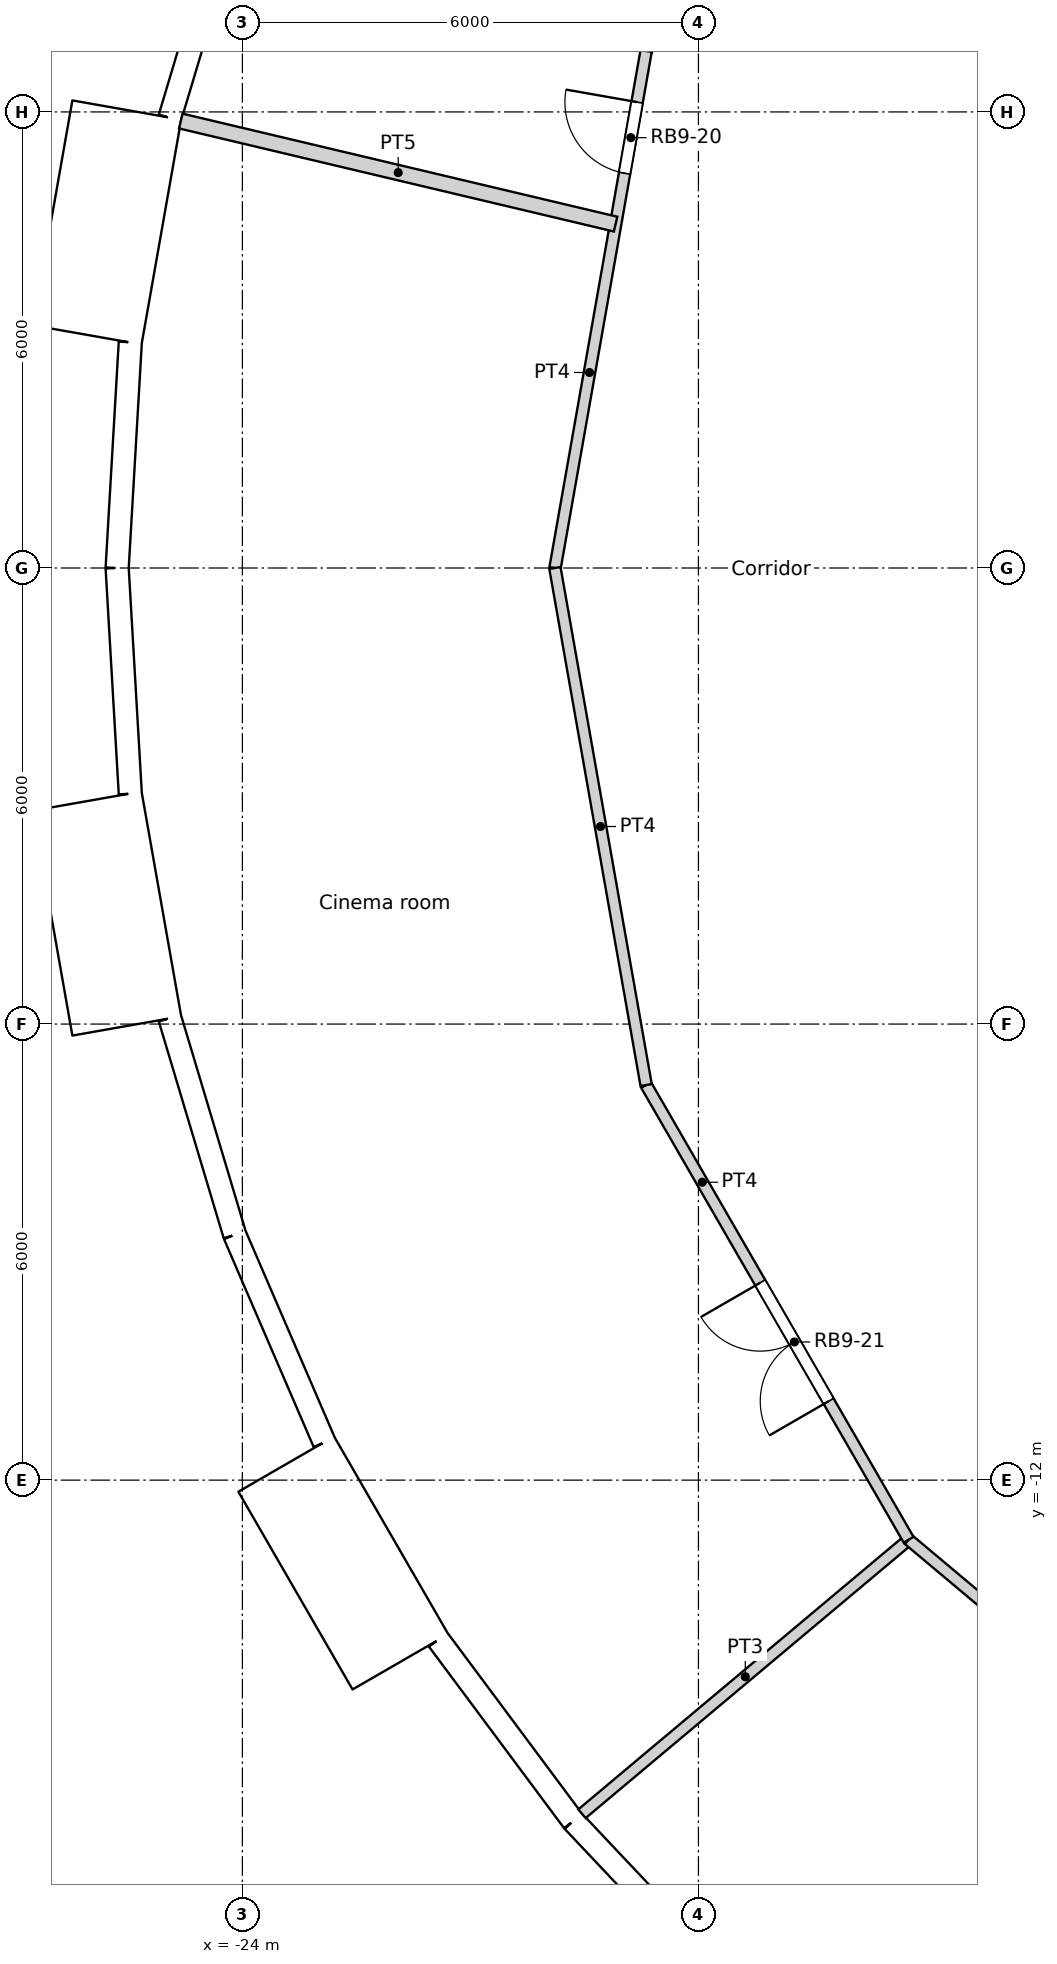
"""IFC4 building model, lengths in metres.
Left out: names, types, materials, properties, quantities, classifications, styles, units other than length and angle.
Written with IfcOpenShell. Run it as: python <this file> out.ifc"""

import sys

from ifc_helpers import new_model, si_unit, direction, frame, frame_2d, origin, origin_2d, place, context, subcontext, project, spatial, rectangle, circle, extrude, element, fill, save


model = new_model("IFC4")
c1 = context("Model", 3, precision=1e-05, world=origin(), true_north=direction((0.0, 1.0)))
c2 = subcontext(c1, "Body", "Model", "MODEL_VIEW")
j1 = project(units=[si_unit("LENGTHUNIT", "METRE"), si_unit("PLANEANGLEUNIT", "RADIAN")], contexts=[c1])
p1 = place(None, origin())
s1 = spatial("IfcSite", under=j1, at=p1, CompositionType="ELEMENT")
p2 = place(p1, origin())
s2 = spatial("IfcBuilding", under=s1, at=p2, CompositionType="ELEMENT")
p3 = place(p2, frame((0.0, 0.0, 212.4)))
s3 = spatial("IfcBuildingStorey", under=s2, at=p3, CompositionType="ELEMENT", Elevation=212.4)
for number, where, z_axis, x_axis in (
    (1, (-24.382, 2.85, 0.0), (0.0, 0.0, 1.0), (1.0, 0.0, 0.0)),
    (2, (-24.382, -2.85, 0.0), (0.0, 0.0, 1.0), (1.0, 0.0, 0.0)),
    (3, (-23.067, -8.396, 0.0), (0.0, 0.0, 1.0), (1.0, 0.0, 0.0)),
    (4, (-20.509, -13.489, 0.0), (0.0, 0.0, 1.0), (1.0, 0.0, 0.0)),
    (5, (-16.846, -17.855, 0.0), (0.0, 0.0, 1.0), (1.0, 0.0, 0.0)),
):
    element("IfcColumn", number, at=place(p3, frame(where, z_axis=z_axis, x_axis=x_axis)), inside=s3, PredefinedType="COLUMN", context=c2, shape_type="SweptSolid", body=[
        extrude(circle(Radius=0.6, at=origin_2d()), origin(), (0.0, 0.0, 1.0), 3.6),
    ])
for number, where, z_axis, x_axis in (
    (6, (-18.612, 2.805, 0.0), (0.0, 0.0, 1.0), (1.0, 0.0, 0.0)),
    (7, (-18.612, -2.805, 0.0), (0.0, 0.0, 1.0), (1.0, 0.0, 0.0)),
    (8, (-16.958, -8.167, 0.0), (0.0, 0.0, 1.0), (1.0, 0.0, 0.0)),
    (9, (-13.798, -12.802, 0.0), (0.0, 0.0, 1.0), (1.0, 0.0, 0.0)),
):
    element("IfcColumn", number, at=place(p3, frame(where, z_axis=z_axis, x_axis=x_axis)), inside=s3, PredefinedType="COLUMN", context=c2, shape_type="SweptSolid", body=[
        extrude(circle(Radius=0.65, at=origin_2d()), origin(), (0.0, 0.0, 1.0), 3.6),
    ])
p4 = place(p3, frame((-24.101, 8.772, 0.0), z_axis=(0.0, 0.0, 1.0), x_axis=(-0.286782750849, -0.957995643944, 0.0)))
e10 = element("IfcWall", 10, at=p4, inside=s3, PredefinedType="SOLIDWALL", context=c2, shape_type="SweptSolid", body=[
    extrude(rectangle(XDim=2.973, YDim=0.3, at=frame_2d((1.486, 0.0))), origin(), (0.0, 0.0, 1.0), 3.3),
])
p5 = place(p4, frame((1.486, 0.0, 1.55)))
e11 = element("IfcOpeningElement", 11, at=p5, cuts=e10, PredefinedType="OPENING", context=c2, shape_type="SweptSolid", body=[
    extrude(circle(Radius=0.9, at=origin_2d()), frame((0.0, 0.16, 0.0), z_axis=(0.0, -1.0, 0.0), x_axis=(1.0, 0.0, 0.0)), (0.0, 0.0, 1.0), 0.32),
])
p6 = place(p3, frame((-25.521, 6.023, -0.3), z_axis=(0.0, 0.0, 1.0), x_axis=(-0.173669267716, -0.984804034035, 0.0)))
e12 = element("IfcWall", 12, at=p6, inside=s3, PredefinedType="ELEMENTEDWALL", context=c2, shape_type="SweptSolid", body=[
    extrude(rectangle(XDim=3.0, YDim=1.45, at=frame_2d((1.5, 0.0))), origin(), (0.0, 0.0, 1.0), 3.6),
])
p7 = place(p6, frame((1.5, 0.0, 1.85)))
e13 = element("IfcOpeningElement", 13, at=p7, cuts=e12, PredefinedType="OPENING", context=c2, shape_type="SweptSolid", body=[
    extrude(circle(Radius=0.9, at=origin_2d()), frame((0.0, 0.735, 0.0), z_axis=(0.0, -1.0, 0.0), x_axis=(1.0, 0.0, 0.0)), (0.0, 0.0, 1.0), 1.47),
])
p8 = place(p3, frame((-25.475, 2.968, 0.0), z_axis=(0.0, 0.0, 1.0), x_axis=(-0.058144307138, -0.998308188661, 0.0)))
e14 = element("IfcWall", 14, at=p8, inside=s3, PredefinedType="SOLIDWALL", context=c2, shape_type="SweptSolid", body=[
    extrude(rectangle(XDim=2.973, YDim=0.3, at=frame_2d((1.486, 0.0))), origin(), (0.0, 0.0, 1.0), 3.3),
])
p9 = place(p8, frame((1.486, 0.0, 1.55)))
e15 = element("IfcOpeningElement", 15, at=p9, cuts=e14, PredefinedType="OPENING", context=c2, shape_type="SweptSolid", body=[
    extrude(circle(Radius=0.9, at=origin_2d()), frame((0.0, 0.16, 0.0), z_axis=(0.0, -1.0, 0.0), x_axis=(1.0, 0.0, 0.0)), (0.0, 0.0, 1.0), 0.32),
])
p10 = place(p3, frame((-25.647, 0.0, 0.0), z_axis=(0.0, 0.0, 1.0), x_axis=(0.058144307138, -0.998308188661, 0.0)))
e16 = element("IfcWall", 16, at=p10, inside=s3, PredefinedType="SOLIDWALL", context=c2, shape_type="SweptSolid", body=[
    extrude(rectangle(XDim=2.973, YDim=0.3, at=frame_2d((1.486, 0.0))), origin(), (0.0, 0.0, 1.0), 3.3),
])
p11 = place(p10, frame((1.486, 0.0, 1.55)))
e17 = element("IfcOpeningElement", 17, at=p11, cuts=e16, PredefinedType="OPENING", context=c2, shape_type="SweptSolid", body=[
    extrude(circle(Radius=0.9, at=origin_2d()), frame((0.0, 0.16, 0.0), z_axis=(0.0, -1.0, 0.0), x_axis=(1.0, 0.0, 0.0)), (0.0, 0.0, 1.0), 0.32),
])
p12 = place(p3, frame((-26.042, -3.069, -0.3), z_axis=(0.0, 0.0, 1.0), x_axis=(0.173669267716, -0.984804034035, 0.0)))
e18 = element("IfcWall", 18, at=p12, inside=s3, PredefinedType="ELEMENTEDWALL", context=c2, shape_type="SweptSolid", body=[
    extrude(rectangle(XDim=3.0, YDim=1.45, at=frame_2d((1.5, 0.0))), origin(), (0.0, 0.0, 1.0), 3.6),
])
p13 = place(p12, frame((1.5, 0.0, 1.85)))
e19 = element("IfcOpeningElement", 19, at=p13, cuts=e18, PredefinedType="OPENING", context=c2, shape_type="SweptSolid", body=[
    extrude(circle(Radius=0.9, at=origin_2d()), frame((0.0, 0.735, 0.0), z_axis=(0.0, -1.0, 0.0), x_axis=(1.0, 0.0, 0.0)), (0.0, 0.0, 1.0), 1.47),
])
p14 = place(p3, frame((-24.953, -5.924, 0.0), z_axis=(0.0, 0.0, 1.0), x_axis=(0.286782750849, -0.957995643944, 0.0)))
e20 = element("IfcWall", 20, at=p14, inside=s3, PredefinedType="SOLIDWALL", context=c2, shape_type="SweptSolid", body=[
    extrude(rectangle(XDim=2.973, YDim=0.3, at=frame_2d((1.486, 0.0))), origin(), (0.0, 0.0, 1.0), 3.3),
])
p15 = place(p14, frame((1.486, 0.0, 1.55)))
e21 = element("IfcOpeningElement", 21, at=p15, cuts=e20, PredefinedType="OPENING", context=c2, shape_type="SweptSolid", body=[
    extrude(circle(Radius=0.9, at=origin_2d()), frame((0.0, 0.16, 0.0), z_axis=(0.0, -1.0, 0.0), x_axis=(1.0, 0.0, 0.0)), (0.0, 0.0, 1.0), 0.32),
])
p16 = place(p3, frame((-24.101, -8.772, 0.0), z_axis=(0.0, 0.0, 1.0), x_axis=(0.396148129016, -0.918186614952, 0.0)))
e22 = element("IfcWall", 22, at=p16, inside=s3, PredefinedType="SOLIDWALL", context=c2, shape_type="SweptSolid", body=[
    extrude(rectangle(XDim=2.973, YDim=0.3, at=frame_2d((1.486, 0.0))), origin(), (0.0, 0.0, 1.0), 3.3),
])
p17 = place(p16, frame((1.486, 0.0, 1.55)))
e23 = element("IfcOpeningElement", 23, at=p17, cuts=e22, PredefinedType="OPENING", context=c2, shape_type="SweptSolid", body=[
    extrude(circle(Radius=0.9, at=origin_2d()), frame((0.0, 0.16, 0.0), z_axis=(0.0, -1.0, 0.0), x_axis=(1.0, 0.0, 0.0)), (0.0, 0.0, 1.0), 0.32),
])
p18 = place(p3, frame((-23.422, -11.791, -0.3), z_axis=(0.0, 0.0, 1.0), x_axis=(0.499990139034, -0.866031096941, 0.0)))
e24 = element("IfcWall", 24, at=p18, inside=s3, PredefinedType="ELEMENTEDWALL", context=c2, shape_type="SweptSolid", body=[
    extrude(rectangle(XDim=3.0, YDim=1.45, at=frame_2d((1.5, 0.0))), origin(), (0.0, 0.0, 1.0), 3.6),
])
p19 = place(p18, frame((1.5, 0.0, 1.85)))
e25 = element("IfcOpeningElement", 25, at=p19, cuts=e24, PredefinedType="OPENING", context=c2, shape_type="SweptSolid", body=[
    extrude(circle(Radius=0.9, at=origin_2d()), frame((0.0, 0.735, 0.0), z_axis=(0.0, -1.0, 0.0), x_axis=(1.0, 0.0, 0.0)), (0.0, 0.0, 1.0), 1.47),
])
p20 = place(p3, frame((-21.422, -14.101, 0.0), z_axis=(0.0, 0.0, 1.0), x_axis=(0.597197580538, -0.80209416517, 0.0)))
e26 = element("IfcWall", 26, at=p20, inside=s3, PredefinedType="SOLIDWALL", context=c2, shape_type="SweptSolid", body=[
    extrude(rectangle(XDim=2.973, YDim=0.3, at=frame_2d((1.486, 0.0))), origin(), (0.0, 0.0, 1.0), 3.3),
])
p21 = place(p20, frame((1.486, 0.0, 1.55)))
e27 = element("IfcOpeningElement", 27, at=p21, cuts=e26, PredefinedType="OPENING", context=c2, shape_type="SweptSolid", body=[
    extrude(circle(Radius=0.9, at=origin_2d()), frame((0.0, 0.16, 0.0), z_axis=(0.0, -1.0, 0.0), x_axis=(1.0, 0.0, 0.0)), (0.0, 0.0, 1.0), 0.32),
])
p22 = place(p3, frame((-19.647, -16.486, 0.0), z_axis=(0.0, 0.0, 1.0), x_axis=(0.686235184166, -0.727379730273, 0.0)))
e28 = element("IfcWall", 28, at=p22, inside=s3, PredefinedType="SOLIDWALL", context=c2, shape_type="SweptSolid", body=[
    extrude(rectangle(XDim=2.973, YDim=0.3, at=frame_2d((1.486, 0.0))), origin(), (0.0, 0.0, 1.0), 3.3),
])
p23 = place(p22, frame((1.486, 0.0, 1.55)))
e29 = element("IfcOpeningElement", 29, at=p23, cuts=e28, PredefinedType="OPENING", context=c2, shape_type="SweptSolid", body=[
    extrude(circle(Radius=0.9, at=origin_2d()), frame((0.0, 0.16, 0.0), z_axis=(0.0, -1.0, 0.0), x_axis=(1.0, 0.0, 0.0)), (0.0, 0.0, 1.0), 0.32),
])
p24 = place(p3, frame((-18.688, 6.802, 0.0), z_axis=(0.0, 0.0, 1.0), x_axis=(0.499914202267, 0.866074933462, 0.0)))
e30 = element("IfcWall", 30, at=p24, inside=s3, PredefinedType="PARTITIONING", context=c2, shape_type="SweptSolid", body=[
    extrude(rectangle(XDim=6.907, YDim=0.15, at=frame_2d((3.454, 0.0))), origin(), (0.0, 0.0, 1.0), 3.15),
])
p25 = place(p24, frame((3.857, 0.0, 0.0)))
e31 = element("IfcOpeningElement", 31, at=p25, cuts=e30, PredefinedType="OPENING", context=c2, shape_type="SweptSolid", body=[
    extrude(rectangle(XDim=1.5, YDim=2.1, at=frame_2d((0.75, 1.05))), frame((0.0, 0.075, 0.0), z_axis=(0.0, -1.0, 0.0), x_axis=(1.0, 0.0, 0.0)), (0.0, 0.0, 1.0), 0.15),
])
p26 = place(p3, frame((-19.886, -0.0, 0.0), z_axis=(0.0, 0.0, 1.0), x_axis=(0.173482860149, 0.984836888644, 0.0)))
e32 = element("IfcWall", 32, at=p26, inside=s3, PredefinedType="PARTITIONING", context=c2, shape_type="SweptSolid", body=[
    extrude(rectangle(XDim=6.907, YDim=0.15, at=frame_2d((3.454, 0.0))), origin(), (0.0, 0.0, 1.0), 3.15),
])
p27 = place(p26, frame((5.274, 0.0, 0.0)))
e33 = element("IfcOpeningElement", 33, at=p27, cuts=e32, PredefinedType="OPENING", context=c2, shape_type="SweptSolid", body=[
    extrude(rectangle(XDim=0.95, YDim=2.1, at=frame_2d((0.475, 1.05))), frame((0.0, 0.075, 0.0), z_axis=(0.0, -1.0, 0.0), x_axis=(1.0, 0.0, 0.0)), (0.0, 0.0, 1.0), 0.15),
])
p28 = place(p3, frame((-18.688, -6.802, 0.0), z_axis=(0.0, 0.0, 1.0), x_axis=(0.499914202267, -0.866074933462, 0.0)))
e34 = element("IfcWall", 34, at=p28, inside=s3, PredefinedType="PARTITIONING", context=c2, shape_type="SweptSolid", body=[
    extrude(rectangle(XDim=6.907, YDim=0.15, at=frame_2d((3.454, 0.0))), origin(), (0.0, 0.0, 1.0), 3.15),
])
p29 = place(p28, frame((3.003, 0.0, 0.0)))
e35 = element("IfcOpeningElement", 35, at=p29, cuts=e34, PredefinedType="OPENING", context=c2, shape_type="SweptSolid", body=[
    extrude(rectangle(XDim=1.8, YDim=2.1, at=frame_2d((0.9, 1.05))), frame((0.0, 0.075, 0.0), z_axis=(0.0, -1.0, 0.0), x_axis=(1.0, 0.0, 0.0)), (0.0, 0.0, 1.0), 0.15),
])
p30 = place(p3, frame((-19.888, 0.0, 0.0), z_axis=(0.0, 0.0, 1.0), x_axis=(0.173728873845, -0.98479352069, 0.0)))
e36 = element("IfcWall", 36, at=p30, inside=s3, PredefinedType="PARTITIONING", context=c2, shape_type="SweptSolid", body=[
    extrude(rectangle(XDim=6.907, YDim=0.15, at=frame_2d((3.454, 0.0))), origin(), (0.0, 0.0, 1.0), 3.15),
])
p31 = place(p3, frame((-15.235, -12.784, 0.0), z_axis=(0.0, 0.0, 1.0), x_axis=(0.766192104565, -0.642611592567, 0.0)))
e37 = element("IfcWall", 37, at=p31, inside=s3, PredefinedType="PARTITIONING", context=c2, shape_type="SweptSolid", body=[
    extrude(rectangle(XDim=6.906, YDim=0.15, at=frame_2d((3.453, 0.0))), origin(), (0.0, 0.0, 1.0), 3.15),
])
p32 = place(p31, frame((3.823, 0.0, 0.0)))
e38 = element("IfcOpeningElement", 38, at=p32, cuts=e37, PredefinedType="OPENING", context=c2, shape_type="SweptSolid", body=[
    extrude(rectangle(XDim=1.0, YDim=2.04, at=frame_2d((0.5, 1.02))), frame((0.0, 0.075, 0.0), z_axis=(0.0, -1.0, 0.0), x_axis=(1.0, 0.0, 0.0)), (0.0, 0.0, 1.0), 0.15),
])
p33 = place(p3, frame((-24.81, 5.88, 0.0), z_axis=(0.0, 0.0, 1.0), x_axis=(0.973033452951, -0.230664040193, 0.0)))
e39 = element("IfcWall", 39, at=p33, inside=s3, PredefinedType="PARTITIONING", context=c2, shape_type="SweptSolid", body=[
    extrude(rectangle(XDim=5.878, YDim=0.2, at=frame_2d((2.939, 0.0))), origin(), (0.0, 0.0, 1.0), 3.15),
])
p34 = place(p3, frame((-19.532, -16.389, 0.0), z_axis=(0.0, 0.0, 1.0), x_axis=(0.76609059793, 0.642732600514, 0.0)))
e40 = element("IfcWall", 40, at=p34, inside=s3, PredefinedType="PARTITIONING", context=c2, shape_type="SweptSolid", body=[
    extrude(rectangle(XDim=5.609, YDim=0.15, at=frame_2d((2.804, 0.0))), origin(), (0.0, 0.0, 1.0), 3.15),
])
p35 = place(p5, origin())
e41 = element("IfcWindow", 41, at=p35, inside=s3, PartitioningType="SINGLE_PANEL", PredefinedType="WINDOW", context=c2, shape_type="SweptSolid", body=[
    extrude(circle(Radius=0.9, at=origin_2d()), frame((0.0, 0.12, 0.0), z_axis=(0.0, -1.0, 0.0), x_axis=(1.0, 0.0, 0.0)), (0.0, 0.0, 1.0), 0.1),
])
fill(e11, e41)
p36 = place(p7, origin())
e42 = element("IfcWindow", 42, at=p36, inside=s3, PartitioningType="SINGLE_PANEL", PredefinedType="WINDOW", context=c2, shape_type="SweptSolid", body=[
    extrude(circle(Radius=0.9, at=origin_2d()), frame((0.0, 0.695, 0.0), z_axis=(0.0, -1.0, 0.0), x_axis=(1.0, 0.0, 0.0)), (0.0, 0.0, 1.0), 0.1),
])
fill(e13, e42)
p37 = place(p9, origin())
e43 = element("IfcWindow", 43, at=p37, inside=s3, PartitioningType="SINGLE_PANEL", PredefinedType="WINDOW", context=c2, shape_type="SweptSolid", body=[
    extrude(circle(Radius=0.9, at=origin_2d()), frame((0.0, 0.12, 0.0), z_axis=(0.0, -1.0, 0.0), x_axis=(1.0, 0.0, 0.0)), (0.0, 0.0, 1.0), 0.1),
])
fill(e15, e43)
p38 = place(p11, origin())
e44 = element("IfcWindow", 44, at=p38, inside=s3, PartitioningType="SINGLE_PANEL", PredefinedType="WINDOW", context=c2, shape_type="SweptSolid", body=[
    extrude(circle(Radius=0.9, at=origin_2d()), frame((0.0, 0.12, 0.0), z_axis=(0.0, -1.0, 0.0), x_axis=(1.0, 0.0, 0.0)), (0.0, 0.0, 1.0), 0.1),
])
fill(e17, e44)
p39 = place(p13, origin())
e45 = element("IfcWindow", 45, at=p39, inside=s3, PartitioningType="SINGLE_PANEL", PredefinedType="WINDOW", context=c2, shape_type="SweptSolid", body=[
    extrude(circle(Radius=0.9, at=origin_2d()), frame((0.0, 0.695, 0.0), z_axis=(0.0, -1.0, 0.0), x_axis=(1.0, 0.0, 0.0)), (0.0, 0.0, 1.0), 0.1),
])
fill(e19, e45)
p40 = place(p15, origin())
e46 = element("IfcWindow", 46, at=p40, inside=s3, PartitioningType="SINGLE_PANEL", PredefinedType="WINDOW", context=c2, shape_type="SweptSolid", body=[
    extrude(circle(Radius=0.9, at=origin_2d()), frame((0.0, 0.12, 0.0), z_axis=(0.0, -1.0, 0.0), x_axis=(1.0, 0.0, 0.0)), (0.0, 0.0, 1.0), 0.1),
])
fill(e21, e46)
p41 = place(p17, origin())
e47 = element("IfcWindow", 47, at=p41, inside=s3, PartitioningType="SINGLE_PANEL", PredefinedType="WINDOW", context=c2, shape_type="SweptSolid", body=[
    extrude(circle(Radius=0.9, at=origin_2d()), frame((0.0, 0.12, 0.0), z_axis=(0.0, -1.0, 0.0), x_axis=(1.0, 0.0, 0.0)), (0.0, 0.0, 1.0), 0.1),
])
fill(e23, e47)
p42 = place(p19, origin())
e48 = element("IfcWindow", 48, at=p42, inside=s3, PartitioningType="SINGLE_PANEL", PredefinedType="WINDOW", context=c2, shape_type="SweptSolid", body=[
    extrude(circle(Radius=0.9, at=origin_2d()), frame((0.0, 0.695, 0.0), z_axis=(0.0, -1.0, 0.0), x_axis=(1.0, 0.0, 0.0)), (0.0, 0.0, 1.0), 0.1),
])
fill(e25, e48)
p43 = place(p21, origin())
e49 = element("IfcWindow", 49, at=p43, inside=s3, PartitioningType="SINGLE_PANEL", PredefinedType="WINDOW", context=c2, shape_type="SweptSolid", body=[
    extrude(circle(Radius=0.9, at=origin_2d()), frame((0.0, 0.12, 0.0), z_axis=(0.0, -1.0, 0.0), x_axis=(1.0, 0.0, 0.0)), (0.0, 0.0, 1.0), 0.1),
])
fill(e27, e49)
p44 = place(p23, origin())
e50 = element("IfcWindow", 50, at=p44, inside=s3, PartitioningType="SINGLE_PANEL", PredefinedType="WINDOW", context=c2, shape_type="SweptSolid", body=[
    extrude(circle(Radius=0.9, at=origin_2d()), frame((0.0, 0.12, 0.0), z_axis=(0.0, -1.0, 0.0), x_axis=(1.0, 0.0, 0.0)), (0.0, 0.0, 1.0), 0.1),
])
fill(e29, e50)
p45 = place(p27, origin())
e51 = element("IfcDoor", 51, at=p45, inside=s3, OperationType="SINGLE_SWING_RIGHT", PredefinedType="DOOR", context=c2, shape_type="SweptSolid", body=[
    extrude(rectangle(XDim=0.95, YDim=2.1, at=frame_2d((0.475, 1.05))), frame((0.0, 0.025, 0.0), z_axis=(0.0, -1.0, 0.0), x_axis=(1.0, 0.0, 0.0)), (0.0, 0.0, 1.0), 0.05),
])
fill(e33, e51)
p46 = place(p29, origin())
e52 = element("IfcDoor", 52, at=p46, inside=s3, OperationType="DOUBLE_DOOR_SINGLE_SWING", PredefinedType="DOOR", context=c2, shape_type="SweptSolid", body=[
    extrude(rectangle(XDim=1.8, YDim=2.1, at=frame_2d((0.9, 1.05))), frame((0.0, 0.025, 0.0), z_axis=(0.0, -1.0, 0.0), x_axis=(1.0, 0.0, 0.0)), (0.0, 0.0, 1.0), 0.05),
])
fill(e35, e52)
save(model, sys.argv[1])
